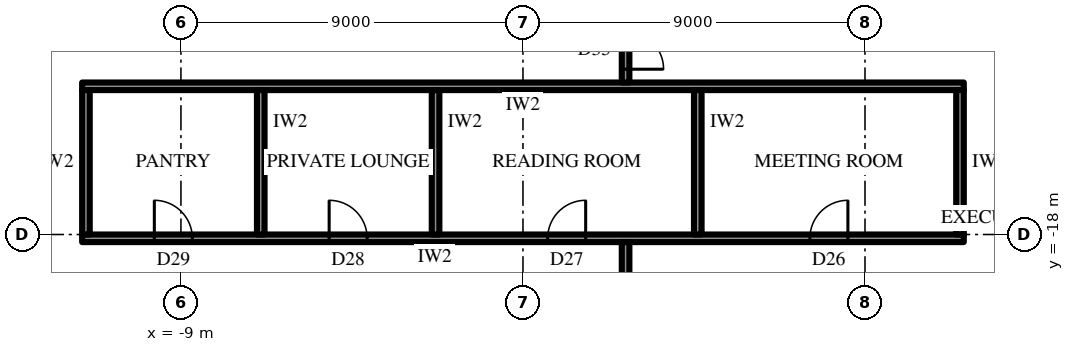
"""IFC4 building model, lengths in metres.
Left out: names, types, materials, properties, quantities, classifications, styles, units other than length and angle.
Written with IfcOpenShell. Run it as: python <this file> out.ifc"""

import sys

from ifc_helpers import new_model, si_unit, direction, frame, frame_2d, origin, place, context, subcontext, project, spatial, rectangle, extrude, element, fill, save


model = new_model("IFC4")
c1 = context("Model", 3, precision=1e-05, world=origin(), true_north=direction((0.0, 1.0)))
c2 = subcontext(c1, "Body", "Model", "MODEL_VIEW")
j1 = project(units=[si_unit("LENGTHUNIT", "METRE"), si_unit("PLANEANGLEUNIT", "RADIAN")], contexts=[c1])
p1 = place(None, origin())
s1 = spatial("IfcSite", under=j1, at=p1, CompositionType="ELEMENT")
p2 = place(p1, origin())
s2 = spatial("IfcBuilding", under=s1, at=p2, CompositionType="ELEMENT")
p3 = place(p2, frame((0.0, 0.0, 328.3)))
s3 = spatial("IfcBuildingStorey", under=s2, at=p3, CompositionType="ELEMENT", Elevation=328.3)
p4 = place(p3, frame((11.6, -14.1, 0.0), z_axis=(0.0, 0.0, 1.0), x_axis=(-1.0, 0.0, 0.0)))
e1 = element("IfcWall", 1, at=p4, inside=s3, PredefinedType="PARTITIONING", context=c2, shape_type="SweptSolid", body=[
    extrude(rectangle(XDim=23.2, YDim=0.2, at=frame_2d((11.6, 0.0))), origin(), (0.0, 0.0, 1.0), 4.0),
])
p5 = place(p3, frame((11.6, -18.1, 0.0), z_axis=(0.0, 0.0, 1.0), x_axis=(-1.0, 0.0, 0.0)))
e2 = element("IfcWall", 2, at=p5, inside=s3, PredefinedType="PARTITIONING", context=c2, shape_type="SweptSolid", body=[
    extrude(rectangle(XDim=23.2, YDim=0.2, at=frame_2d((11.6, 0.0))), origin(), (0.0, 0.0, 1.0), 4.0),
])
p6 = place(p5, frame((3.05, 0.0, 0.0)))
e3 = element("IfcOpeningElement", 3, at=p6, cuts=e2, PredefinedType="OPENING", context=c2, shape_type="SweptSolid", body=[
    extrude(rectangle(XDim=1.0, YDim=2.2, at=frame_2d((0.5, 1.1))), frame((0.0, 0.11, 0.0), z_axis=(0.0, -1.0, 0.0), x_axis=(1.0, 0.0, 0.0)), (0.0, 0.0, 1.0), 0.22),
])
p7 = place(p5, frame((9.95, 0.0, 0.0)))
e4 = element("IfcOpeningElement", 4, at=p7, cuts=e2, PredefinedType="OPENING", context=c2, shape_type="SweptSolid", body=[
    extrude(rectangle(XDim=1.0, YDim=2.2, at=frame_2d((0.5, 1.1))), frame((0.0, 0.11, 0.0), z_axis=(0.0, -1.0, 0.0), x_axis=(1.0, 0.0, 0.0)), (0.0, 0.0, 1.0), 0.22),
])
p8 = place(p5, frame((15.7, 0.0, 0.0)))
e5 = element("IfcOpeningElement", 5, at=p8, cuts=e2, PredefinedType="OPENING", context=c2, shape_type="SweptSolid", body=[
    extrude(rectangle(XDim=1.0, YDim=2.2, at=frame_2d((0.5, 1.1))), frame((0.0, 0.11, 0.0), z_axis=(0.0, -1.0, 0.0), x_axis=(1.0, 0.0, 0.0)), (0.0, 0.0, 1.0), 0.22),
])
p9 = place(p5, frame((20.3, 0.0, 0.0)))
e6 = element("IfcOpeningElement", 6, at=p9, cuts=e2, PredefinedType="OPENING", context=c2, shape_type="SweptSolid", body=[
    extrude(rectangle(XDim=1.0, YDim=2.2, at=frame_2d((0.5, 1.1))), frame((0.0, 0.11, 0.0), z_axis=(0.0, -1.0, 0.0), x_axis=(1.0, 0.0, 0.0)), (0.0, 0.0, 1.0), 0.22),
])
for number, where, z_axis, x_axis in (
    (7, (11.5, -14.2, 0.0), (0.0, 0.0, 1.0), (0.0, -1.0, 0.0)),
    (8, (4.6, -14.2, 0.0), (0.0, 0.0, 1.0), (0.0, -1.0, 0.0)),
    (9, (-2.3, -14.2, 0.0), (0.0, 0.0, 1.0), (0.0, -1.0, 0.0)),
    (10, (-6.9, -14.2, 0.0), (0.0, 0.0, 1.0), (0.0, -1.0, 0.0)),
    (11, (-11.5, -14.2, 0.0), (0.0, 0.0, 1.0), (0.0, -1.0, 0.0)),
):
    element("IfcWall", number, at=place(p3, frame(where, z_axis=z_axis, x_axis=x_axis)), inside=s3, PredefinedType="PARTITIONING", context=c2, shape_type="SweptSolid", body=[
        extrude(rectangle(XDim=3.8, YDim=0.2, at=frame_2d((1.9, 0.0))), origin(), (0.0, 0.0, 1.0), 4.0),
    ])
p10 = place(p3, frame((2.7, -12.3, 0.0), z_axis=(0.0, 0.0, 1.0), x_axis=(0.0, -1.0, 0.0)))
e12 = element("IfcWall", 12, at=p10, inside=s3, PredefinedType="PARTITIONING", context=c2, shape_type="SweptSolid", body=[
    extrude(rectangle(XDim=1.7, YDim=0.2, at=frame_2d((0.85, 0.0))), origin(), (0.0, 0.0, 1.0), 4.0),
])
p11 = place(p10, frame((0.35, 0.0, 0.0)))
e13 = element("IfcOpeningElement", 13, at=p11, cuts=e12, PredefinedType="OPENING", context=c2, shape_type="SweptSolid", body=[
    extrude(rectangle(XDim=1.0, YDim=2.2, at=frame_2d((0.5, 1.1))), frame((0.0, 0.11, 0.0), z_axis=(0.0, -1.0, 0.0), x_axis=(1.0, 0.0, 0.0)), (0.0, 0.0, 1.0), 0.22),
])
p12 = place(p3, frame((2.7, -18.2, 0.0), z_axis=(0.0, 0.0, 1.0), x_axis=(0.0, -1.0, 0.0)))
e14 = element("IfcWall", 14, at=p12, inside=s3, PredefinedType="PARTITIONING", context=c2, shape_type="SweptSolid", body=[
    extrude(rectangle(XDim=8.35, YDim=0.2, at=frame_2d((4.175, 0.0))), origin(), (0.0, 0.0, 1.0), 4.0),
])
p13 = place(p6, frame((1.0, 0.0, 0.0), z_axis=(0.0, 0.0, 1.0), x_axis=(-1.0, 0.0, 0.0)))
e15 = element("IfcDoor", 15, at=p13, inside=s3, OperationType="SINGLE_SWING_LEFT", PredefinedType="DOOR", context=c2, shape_type="SweptSolid", body=[
    extrude(rectangle(XDim=1.0, YDim=2.2, at=frame_2d((0.5, 1.1))), frame((0.0, 0.025, 0.0), z_axis=(0.0, -1.0, 0.0), x_axis=(1.0, 0.0, 0.0)), (0.0, 0.0, 1.0), 0.05),
])
fill(e3, e15)
p14 = place(p7, frame((1.0, 0.0, 0.0), z_axis=(0.0, 0.0, 1.0), x_axis=(-1.0, 0.0, 0.0)))
e16 = element("IfcDoor", 16, at=p14, inside=s3, OperationType="SINGLE_SWING_LEFT", PredefinedType="DOOR", context=c2, shape_type="SweptSolid", body=[
    extrude(rectangle(XDim=1.0, YDim=2.2, at=frame_2d((0.5, 1.1))), frame((0.0, 0.025, 0.0), z_axis=(0.0, -1.0, 0.0), x_axis=(1.0, 0.0, 0.0)), (0.0, 0.0, 1.0), 0.05),
])
fill(e4, e16)
p15 = place(p8, frame((1.0, 0.0, 0.0), z_axis=(0.0, 0.0, 1.0), x_axis=(-1.0, 0.0, 0.0)))
e17 = element("IfcDoor", 17, at=p15, inside=s3, OperationType="SINGLE_SWING_RIGHT", PredefinedType="DOOR", context=c2, shape_type="SweptSolid", body=[
    extrude(rectangle(XDim=1.0, YDim=2.2, at=frame_2d((0.5, 1.1))), frame((0.0, 0.025, 0.0), z_axis=(0.0, -1.0, 0.0), x_axis=(1.0, 0.0, 0.0)), (0.0, 0.0, 1.0), 0.05),
])
fill(e5, e17)
p16 = place(p9, frame((1.0, 0.0, 0.0), z_axis=(0.0, 0.0, 1.0), x_axis=(-1.0, 0.0, 0.0)))
e18 = element("IfcDoor", 18, at=p16, inside=s3, OperationType="SINGLE_SWING_RIGHT", PredefinedType="DOOR", context=c2, shape_type="SweptSolid", body=[
    extrude(rectangle(XDim=1.0, YDim=2.2, at=frame_2d((0.5, 1.1))), frame((0.0, 0.025, 0.0), z_axis=(0.0, -1.0, 0.0), x_axis=(1.0, 0.0, 0.0)), (0.0, 0.0, 1.0), 0.05),
])
fill(e6, e18)
p17 = place(p11, origin())
e19 = element("IfcDoor", 19, at=p17, inside=s3, OperationType="SINGLE_SWING_LEFT", PredefinedType="DOOR", context=c2, shape_type="SweptSolid", body=[
    extrude(rectangle(XDim=1.0, YDim=2.2, at=frame_2d((0.5, 1.1))), frame((0.0, 0.025, 0.0), z_axis=(0.0, -1.0, 0.0), x_axis=(1.0, 0.0, 0.0)), (0.0, 0.0, 1.0), 0.05),
])
fill(e13, e19)
save(model, sys.argv[1])
